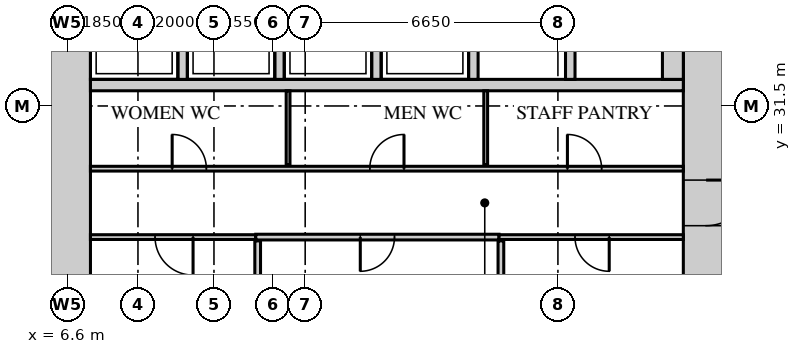
"""IFC4 building model, lengths in metres.
Left out: names, types, materials, properties, quantities, classifications, styles, units other than length and angle.
Written with IfcOpenShell. Run it as: python <this file> out.ifc"""

import sys

from ifc_helpers import new_model, si_unit, direction, frame, frame_2d, origin, place, context, subcontext, project, spatial, rectangle, extrude, source, transform, mapped, element, fill, save


model = new_model("IFC4")
c1 = context("Model", 3, precision=1e-05, world=origin(), true_north=direction((0.0, 1.0)))
c2 = subcontext(c1, "Body", "Model", "MODEL_VIEW")
j1 = project(units=[si_unit("LENGTHUNIT", "METRE"), si_unit("PLANEANGLEUNIT", "RADIAN")], contexts=[c1])
p1 = place(None, origin())
s1 = spatial("IfcSite", under=j1, at=p1, CompositionType="ELEMENT")
p2 = place(p1, origin())
s2 = spatial("IfcBuilding", under=s1, at=p2, CompositionType="ELEMENT")
p3 = place(p2, frame((0.0, 0.0, 7.5)))
s3 = spatial("IfcBuildingStorey", under=s2, at=p3, CompositionType="ELEMENT", Elevation=7.5)
m1 = source(origin(), c2, "Body", "SweptSolid", [
    extrude(rectangle(XDim=27.6, YDim=1.2, at=frame_2d((13.8, 0.0))), origin(), (0.0, 0.0, 1.0), 5.2),
])
p4 = place(p3, frame((23.4, 13.2, 0.0), z_axis=(0.0, 0.0, 1.0), x_axis=(0.0, 1.0, 0.0)))
e1 = element("IfcWall", 1, at=p4, inside=s3, PredefinedType="SHEAR", context=c2, shape_type="MappedRepresentation", body=[
    mapped(m1, transform((0.0, 0.0, 0.0))),
])
m2 = source(origin(), c2, "Body", "SweptSolid", [
    extrude(rectangle(XDim=1.8, YDim=2.1, at=frame_2d((0.9, 1.05))), frame((0.0, 0.61, 0.0), z_axis=(0.0, -1.0, 0.0), x_axis=(1.0, 0.0, 0.0)), (0.0, 0.0, 1.0), 1.22),
])
p5 = place(p4, frame((22.4, 0.0, 0.0)))
e2 = element("IfcOpeningElement", 2, at=p5, cuts=e1, PredefinedType="OPENING", context=c2, shape_type="MappedRepresentation", body=[
    mapped(m2, transform((0.0, 0.0, 0.0))),
])
m3 = source(origin(), c2, "Body", "SweptSolid", [
    extrude(rectangle(XDim=1.2, YDim=2.1, at=frame_2d((0.6, 1.05))), frame((0.0, 0.61, 0.0), z_axis=(0.0, -1.0, 0.0), x_axis=(1.0, 0.0, 0.0)), (0.0, 0.0, 1.0), 1.22),
])
p6 = place(p4, frame((15.15, 0.0, 0.0)))
e3 = element("IfcOpeningElement", 3, at=p6, cuts=e1, PredefinedType="OPENING", context=c2, shape_type="MappedRepresentation", body=[
    mapped(m3, transform((0.0, 0.0, 0.0))),
])
m4 = source(origin(), c2, "Body", "SweptSolid", [
    extrude(rectangle(XDim=0.9, YDim=2.1, at=frame_2d((0.45, 1.05))), frame((0.0, 0.61, 0.0), z_axis=(0.0, -1.0, 0.0), x_axis=(1.0, 0.0, 0.0)), (0.0, 0.0, 1.0), 1.22),
])
p7 = place(p4, frame((1.15, 0.0, 0.0)))
e4 = element("IfcOpeningElement", 4, at=p7, cuts=e1, PredefinedType="OPENING", context=c2, shape_type="MappedRepresentation", body=[
    mapped(m4, transform((0.0, 0.0, 0.0))),
])
p8 = place(p4, frame((4.35, 0.0, 0.0)))
e5 = element("IfcOpeningElement", 5, at=p8, cuts=e1, PredefinedType="OPENING", context=c2, shape_type="MappedRepresentation", body=[
    mapped(m4, transform((0.0, 0.0, 0.0))),
])
p9 = place(p4, frame((7.6, 0.0, 0.0)))
e6 = element("IfcOpeningElement", 6, at=p9, cuts=e1, PredefinedType="OPENING", context=c2, shape_type="MappedRepresentation", body=[
    mapped(m4, transform((0.0, 0.0, 0.0))),
])
p10 = place(p3, frame((6.6, 13.2, 0.0), z_axis=(0.0, 0.0, 1.0), x_axis=(0.0, 1.0, 0.0)))
e7 = element("IfcWall", 7, at=p10, inside=s3, PredefinedType="SHEAR", context=c2, shape_type="MappedRepresentation", body=[
    mapped(m1, transform((0.0, 0.0, 0.0))),
])
m5 = source(origin(), c2, "Body", "SweptSolid", [
    extrude(rectangle(XDim=15.6, YDim=0.3, at=frame_2d((7.8, 0.0))), origin(), (0.0, 0.0, 1.0), 5.2),
])
p11 = place(p3, frame((7.2, 32.05, 0.0), z_axis=(0.0, 0.0, 1.0), x_axis=(1.0, 0.0, 0.0)))
e8 = element("IfcWall", 8, at=p11, inside=s3, PredefinedType="STANDARD", context=c2, shape_type="MappedRepresentation", body=[
    mapped(m5, transform((0.0, 0.0, 0.0))),
])
m6 = source(origin(), c2, "Body", "SweptSolid", [
    extrude(rectangle(XDim=2.4, YDim=0.25, at=frame_2d((1.2, 0.0))), origin(), (0.0, 0.0, 1.0), 5.2),
])
for number, where, z_axis, x_axis in (
    (9, (9.625, 32.2, 0.0), (0.0, 0.0, 1.0), (0.0, 1.0, 0.0)),
    (10, (12.175, 32.2, 0.0), (0.0, 0.0, 1.0), (0.0, 1.0, 0.0)),
    (11, (14.725, 32.2, 0.0), (0.0, 0.0, 1.0), (0.0, 1.0, 0.0)),
    (12, (17.275, 32.2, 0.0), (0.0, 0.0, 1.0), (0.0, 1.0, 0.0)),
    (13, (19.825, 32.2, 0.0), (0.0, 0.0, 1.0), (0.0, 1.0, 0.0)),
):
    element("IfcWall", number, at=place(p3, frame(where, z_axis=z_axis, x_axis=x_axis)), inside=s3, PredefinedType="STANDARD", context=c2, shape_type="MappedRepresentation", body=[
        mapped(m6, transform((0.0, 0.0, 0.0))),
    ])
m7 = source(origin(), c2, "Body", "SweptSolid", [
    extrude(rectangle(XDim=2.4, YDim=0.55, at=frame_2d((1.2, 0.0))), origin(), (0.0, 0.0, 1.0), 5.2),
])
p12 = place(p3, frame((22.525, 32.2, 0.0), z_axis=(0.0, 0.0, 1.0), x_axis=(0.0, 1.0, 0.0)))
e14 = element("IfcWall", 14, at=p12, inside=s3, PredefinedType="STANDARD", context=c2, shape_type="MappedRepresentation", body=[
    mapped(m7, transform((0.0, 0.0, 0.0))),
])
m8 = source(origin(), c2, "Body", "SweptSolid", [
    extrude(rectangle(XDim=5.05, YDim=0.15, at=frame_2d((2.525, 0.0))), origin(), (0.0, 0.0, 1.0), 5.2),
])
p13 = place(p3, frame((11.6, 22.9, 0.0), z_axis=(0.0, 0.0, 1.0), x_axis=(0.0, 1.0, 0.0)))
e15 = element("IfcWall", 15, at=p13, inside=s3, PredefinedType="PARTITIONING", context=c2, shape_type="MappedRepresentation", body=[
    mapped(m8, transform((0.0, 0.0, 0.0))),
])
m9 = source(origin(), c2, "Body", "SweptSolid", [
    extrude(rectangle(XDim=5.0, YDim=0.15, at=frame_2d((2.5, 0.0))), origin(), (0.0, 0.0, 1.0), 5.2),
])
p14 = place(p3, frame((18.0, 22.95, 0.0), z_axis=(0.0, 0.0, 1.0), x_axis=(0.0, 1.0, 0.0)))
e16 = element("IfcWall", 16, at=p14, inside=s3, PredefinedType="PARTITIONING", context=c2, shape_type="MappedRepresentation", body=[
    mapped(m9, transform((0.0, 0.0, 0.0))),
])
m10 = source(origin(), c2, "Body", "SweptSolid", [
    extrude(rectangle(XDim=4.35, YDim=0.125, at=frame_2d((2.175, 0.0))), origin(), (0.0, 0.0, 1.0), 5.2),
])
p15 = place(p3, frame((7.2, 28.05, 0.0), z_axis=(0.0, 0.0, 1.0), x_axis=(1.0, 0.0, 0.0)))
e17 = element("IfcWall", 17, at=p15, inside=s3, PredefinedType="PARTITIONING", context=c2, shape_type="MappedRepresentation", body=[
    mapped(m10, transform((0.0, 0.0, 0.0))),
])
m11 = source(origin(), c2, "Body", "SweptSolid", [
    extrude(rectangle(XDim=1.0, YDim=2.1, at=frame_2d((0.5, 1.05))), frame((0.0, 0.073, 0.0), z_axis=(0.0, -1.0, 0.0), x_axis=(1.0, 0.0, 0.0)), (0.0, 0.0, 1.0), 0.145),
])
p16 = place(p15, frame((1.7, 0.0, 0.0)))
e18 = element("IfcOpeningElement", 18, at=p16, cuts=e17, PredefinedType="OPENING", context=c2, shape_type="MappedRepresentation", body=[
    mapped(m11, transform((0.0, 0.0, 0.0))),
])
m12 = source(origin(), c2, "Body", "SweptSolid", [
    extrude(rectangle(XDim=6.4, YDim=0.15, at=frame_2d((3.2, 0.0))), origin(), (0.0, 0.0, 1.0), 5.2),
])
p17 = place(p3, frame((11.55, 28.05, 0.0), z_axis=(0.0, 0.0, 1.0), x_axis=(1.0, 0.0, 0.0)))
e19 = element("IfcWall", 19, at=p17, inside=s3, PredefinedType="PARTITIONING", context=c2, shape_type="MappedRepresentation", body=[
    mapped(m12, transform((0.0, 0.0, 0.0))),
])
m13 = source(origin(), c2, "Body", "SweptSolid", [
    extrude(rectangle(XDim=0.9, YDim=2.1, at=frame_2d((0.45, 1.05))), frame((0.0, 0.085, 0.0), z_axis=(0.0, -1.0, 0.0), x_axis=(1.0, 0.0, 0.0)), (0.0, 0.0, 1.0), 0.17),
])
p18 = place(p17, frame((2.75, 0.0, 0.0)))
e20 = element("IfcOpeningElement", 20, at=p18, cuts=e19, PredefinedType="OPENING", context=c2, shape_type="MappedRepresentation", body=[
    mapped(m13, transform((0.0, 0.0, 0.0))),
])
m14 = source(origin(), c2, "Body", "SweptSolid", [
    extrude(rectangle(XDim=4.85, YDim=0.125, at=frame_2d((2.425, 0.0))), origin(), (0.0, 0.0, 1.0), 5.2),
])
p19 = place(p3, frame((17.95, 28.05, 0.0), z_axis=(0.0, 0.0, 1.0), x_axis=(1.0, 0.0, 0.0)))
e21 = element("IfcWall", 21, at=p19, inside=s3, PredefinedType="PARTITIONING", context=c2, shape_type="MappedRepresentation", body=[
    mapped(m14, transform((0.0, 0.0, 0.0))),
])
m15 = source(origin(), c2, "Body", "SweptSolid", [
    extrude(rectangle(XDim=0.9, YDim=2.1, at=frame_2d((0.45, 1.05))), frame((0.0, 0.073, 0.0), z_axis=(0.0, -1.0, 0.0), x_axis=(1.0, 0.0, 0.0)), (0.0, 0.0, 1.0), 0.145),
])
p20 = place(p19, frame((2.0, 0.0, 0.0)))
e22 = element("IfcOpeningElement", 22, at=p20, cuts=e21, PredefinedType="OPENING", context=c2, shape_type="MappedRepresentation", body=[
    mapped(m15, transform((0.0, 0.0, 0.0))),
])
m16 = source(origin(), c2, "Body", "SweptSolid", [
    extrude(rectangle(XDim=15.6, YDim=0.125, at=frame_2d((7.8, 0.0))), origin(), (0.0, 0.0, 1.0), 5.2),
])
p21 = place(p3, frame((7.2, 29.85, 0.0), z_axis=(0.0, 0.0, 1.0), x_axis=(1.0, 0.0, 0.0)))
e23 = element("IfcWall", 23, at=p21, inside=s3, PredefinedType="PARTITIONING", context=c2, shape_type="MappedRepresentation", body=[
    mapped(m16, transform((0.0, 0.0, 0.0))),
])
p22 = place(p21, frame((2.15, 0.0, 0.0)))
e24 = element("IfcOpeningElement", 24, at=p22, cuts=e23, PredefinedType="OPENING", context=c2, shape_type="MappedRepresentation", body=[
    mapped(m15, transform((0.0, 0.0, 0.0))),
])
p23 = place(p21, frame((7.35, 0.0, 0.0)))
e25 = element("IfcOpeningElement", 25, at=p23, cuts=e23, PredefinedType="OPENING", context=c2, shape_type="MappedRepresentation", body=[
    mapped(m15, transform((0.0, 0.0, 0.0))),
])
p24 = place(p21, frame((12.55, 0.0, 0.0)))
e26 = element("IfcOpeningElement", 26, at=p24, cuts=e23, PredefinedType="OPENING", context=c2, shape_type="MappedRepresentation", body=[
    mapped(m15, transform((0.0, 0.0, 0.0))),
])
m17 = source(origin(), c2, "Body", "SweptSolid", [
    extrude(rectangle(XDim=1.95, YDim=0.1, at=frame_2d((0.975, 0.0))), origin(), (0.0, 0.0, 1.0), 5.2),
])
for number, where, z_axis, x_axis in (
    (27, (12.4, 29.95, 0.0), (0.0, 0.0, 1.0), (0.0, 1.0, 0.0)),
    (28, (17.6, 29.95, 0.0), (0.0, 0.0, 1.0), (0.0, 1.0, 0.0)),
):
    element("IfcWall", number, at=place(p3, frame(where, z_axis=z_axis, x_axis=x_axis)), inside=s3, PredefinedType="PARTITIONING", context=c2, shape_type="MappedRepresentation", body=[
        mapped(m17, transform((0.0, 0.0, 0.0))),
    ])
m18 = source(origin(), c2, "Body", "SweptSolid", [
    extrude(rectangle(XDim=1.2, YDim=2.1, at=frame_2d((0.6, 1.05))), frame((0.0, 0.55, 0.0), z_axis=(0.0, -1.0, 0.0), x_axis=(1.0, 0.0, 0.0)), (0.0, 0.0, 1.0), 1.1),
])
p25 = place(p6, origin())
e29 = element("IfcDoor", 29, at=p25, inside=s3, OperationType="SINGLE_SWING_RIGHT", PredefinedType="DOOR", context=c2, shape_type="MappedRepresentation", body=[
    mapped(m18, transform((0.0, 0.0, 0.0))),
])
fill(e3, e29)
m19 = source(origin(), c2, "Body", "SweptSolid", [
    extrude(rectangle(XDim=0.9, YDim=2.1, at=frame_2d((0.45, 1.05))), frame((0.0, 0.025, 0.0), z_axis=(0.0, -1.0, 0.0), x_axis=(1.0, 0.0, 0.0)), (0.0, 0.0, 1.0), 0.05),
])
p26 = place(p22, origin())
e30 = element("IfcDoor", 30, at=p26, inside=s3, OperationType="SINGLE_SWING_RIGHT", PredefinedType="DOOR", context=c2, shape_type="MappedRepresentation", body=[
    mapped(m19, transform((0.0, 0.0, 0.0))),
])
fill(e24, e30)
p27 = place(p23, origin())
e31 = element("IfcDoor", 31, at=p27, inside=s3, OperationType="SINGLE_SWING_LEFT", PredefinedType="DOOR", context=c2, shape_type="MappedRepresentation", body=[
    mapped(m19, transform((0.0, 0.0, 0.0))),
])
fill(e25, e31)
p28 = place(p24, origin())
e32 = element("IfcDoor", 32, at=p28, inside=s3, OperationType="SINGLE_SWING_RIGHT", PredefinedType="DOOR", context=c2, shape_type="MappedRepresentation", body=[
    mapped(m19, transform((0.0, 0.0, 0.0))),
])
fill(e26, e32)
m20 = source(origin(), c2, "Body", "SweptSolid", [
    extrude(rectangle(XDim=1.0, YDim=2.1, at=frame_2d((0.5, 1.05))), frame((0.0, 0.025, 0.0), z_axis=(0.0, -1.0, 0.0), x_axis=(1.0, 0.0, 0.0)), (0.0, 0.0, 1.0), 0.05),
])
p29 = place(p16, origin())
e33 = element("IfcDoor", 33, at=p29, inside=s3, OperationType="SINGLE_SWING_RIGHT", PredefinedType="DOOR", context=c2, shape_type="MappedRepresentation", body=[
    mapped(m20, transform((0.0, 0.0, 0.0))),
])
fill(e18, e33)
p30 = place(p18, origin())
e34 = element("IfcDoor", 34, at=p30, inside=s3, OperationType="SINGLE_SWING_LEFT", PredefinedType="DOOR", context=c2, shape_type="MappedRepresentation", body=[
    mapped(m19, transform((0.0, 0.0, 0.0))),
])
fill(e20, e34)
p31 = place(p20, origin())
e35 = element("IfcDoor", 35, at=p31, inside=s3, OperationType="SINGLE_SWING_RIGHT", PredefinedType="DOOR", context=c2, shape_type="MappedRepresentation", body=[
    mapped(m19, transform((0.0, 0.0, 0.0))),
])
fill(e22, e35)
save(model, sys.argv[1])
